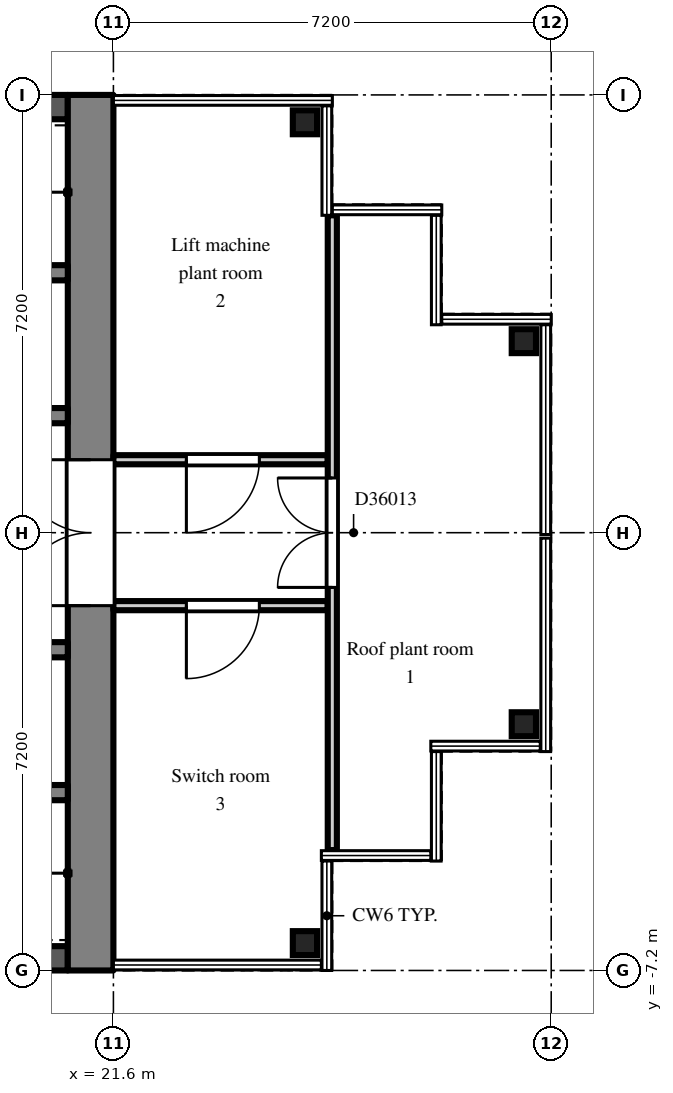
"""IFC4 building model, lengths in metres.
Left out: names, types, materials, properties, quantities, classifications, styles, units other than length and angle.
Written with IfcOpenShell. Run it as: python <this file> out.ifc"""

import sys

from ifc_helpers import new_model, si_unit, direction, frame, frame_2d, origin, origin_2d, place, context, subcontext, project, spatial, polyline, rectangle, i_section, outline, extrude, element, fill, save


model = new_model("IFC4")
c1 = context("Model", 3, precision=1e-05, world=origin(), true_north=direction((0.0, 1.0)))
c2 = subcontext(c1, "Body", "Model", "MODEL_VIEW")
j1 = project(units=[si_unit("LENGTHUNIT", "METRE"), si_unit("PLANEANGLEUNIT", "RADIAN")], contexts=[c1])
p1 = place(None, origin())
s1 = spatial("IfcSite", under=j1, at=p1, CompositionType="ELEMENT")
p2 = place(p1, origin())
s2 = spatial("IfcBuilding", under=s1, at=p2, CompositionType="ELEMENT")
p3 = place(p2, frame((0.0, 0.0, 247.5)))
s3 = spatial("IfcBuildingStorey", under=s2, at=p3, CompositionType="ELEMENT", Elevation=247.5)
for number, where, z_axis, x_axis in (
    (1, (24.75, -6.75, 0.0), (0.0, 0.0, 1.0), (1.0, 0.0, 0.0)),
    (2, (24.75, 6.75, 0.0), (0.0, 0.0, 1.0), (1.0, 0.0, 0.0)),
):
    element("IfcColumn", number, at=place(p3, frame(where, z_axis=z_axis, x_axis=x_axis)), inside=s3, PredefinedType="COLUMN", context=c2, shape_type="SweptSolid", body=[
        extrude(i_section(OverallWidth=0.399, OverallDepth=0.394, WebThickness=0.023, FlangeThickness=0.037, FilletRadius=0.015, at=origin_2d()), origin(), (0.0, 0.0, 1.0), 9.812),
    ])
for number, where, z_axis, x_axis in (
    (3, (28.35, -3.15, 0.0), (0.0, 0.0, 1.0), (1.0, 0.0, 0.0)),
    (4, (28.35, 3.15, 0.0), (0.0, 0.0, 1.0), (1.0, 0.0, 0.0)),
):
    element("IfcColumn", number, at=place(p3, frame(where, z_axis=z_axis, x_axis=x_axis)), inside=s3, PredefinedType="COLUMN", context=c2, shape_type="SweptSolid", body=[
        extrude(i_section(OverallWidth=0.399, OverallDepth=0.394, WebThickness=0.023, FlangeThickness=0.037, FilletRadius=0.015, at=origin_2d()), origin(), (0.0, 0.0, 1.0), 11.861),
    ])
p4 = place(p3, frame((21.225, -7.2, 0.0), z_axis=(0.0, 0.0, 1.0), x_axis=(0.0, 1.0, 0.0)))
e5 = element("IfcWall", 5, at=p4, inside=s3, PredefinedType="SHEAR", context=c2, shape_type="SweptSolid", body=[
    extrude(outline(polyline([(0.0, 0.0), (14.4, 0.0), (14.4, 10.033), (7.2, 13.7), (0.0, 10.033), (0.0, 0.0)])), frame((0.0, 0.375, 0.0), z_axis=(0.0, -1.0, 0.0), x_axis=(1.0, 0.0, 0.0)), (0.0, 0.0, 1.0), 0.75),
])
p5 = place(p4, frame((6.0, 0.0, 0.0)))
e6 = element("IfcOpeningElement", 6, at=p5, cuts=e5, PredefinedType="OPENING", context=c2, shape_type="SweptSolid", body=[
    extrude(rectangle(XDim=2.4, YDim=2.2, at=frame_2d((1.2, 1.1))), frame((0.0, 0.385, 0.0), z_axis=(0.0, -1.0, 0.0), x_axis=(1.0, 0.0, 0.0)), (0.0, 0.0, 1.0), 0.77),
])
p6 = place(p3, frame((7.9, 7.0, 0.0), z_axis=(0.0, 0.0, 1.0), x_axis=(1.0, 0.0, 0.0)))
e7 = element("IfcWall", 7, at=p6, inside=s3, PredefinedType="SHEAR", context=c2, shape_type="SweptSolid", body=[
    extrude(rectangle(XDim=12.95, YDim=0.4, at=frame_2d((6.475, 0.0))), origin(), (0.0, 0.0, 1.0), 10.135),
])
p7 = place(p3, frame((7.9, 1.925, 0.0), z_axis=(0.0, 0.0, 1.0), x_axis=(1.0, 0.0, 0.0)))
e8 = element("IfcWall", 8, at=p7, inside=s3, PredefinedType="SHEAR", context=c2, shape_type="SweptSolid", body=[
    extrude(rectangle(XDim=12.95, YDim=0.25, at=frame_2d((6.475, 0.0))), origin(), (0.0, 0.0, 1.0), 12.72),
])
p8 = place(p7, frame((0.525, 0.0, 0.0)))
e9 = element("IfcOpeningElement", 9, at=p8, cuts=e8, PredefinedType="OPENING", context=c2, shape_type="SweptSolid", body=[
    extrude(rectangle(XDim=0.9, YDim=2.1, at=frame_2d((0.45, 1.05))), frame((0.0, 0.135, 0.0), z_axis=(0.0, -1.0, 0.0), x_axis=(1.0, 0.0, 0.0)), (0.0, 0.0, 1.0), 0.27),
])
p9 = place(p7, frame((2.625, 0.0, 0.0)))
e10 = element("IfcOpeningElement", 10, at=p9, cuts=e8, PredefinedType="OPENING", context=c2, shape_type="SweptSolid", body=[
    extrude(rectangle(XDim=1.1, YDim=2.1, at=frame_2d((0.55, 1.05))), frame((0.0, 0.135, 0.0), z_axis=(0.0, -1.0, 0.0), x_axis=(1.0, 0.0, 0.0)), (0.0, 0.0, 1.0), 0.27),
])
p10 = place(p7, frame((4.925, 0.0, 0.0)))
e11 = element("IfcOpeningElement", 11, at=p10, cuts=e8, PredefinedType="OPENING", context=c2, shape_type="SweptSolid", body=[
    extrude(rectangle(XDim=0.9, YDim=2.1, at=frame_2d((0.45, 1.05))), frame((0.0, 0.135, 0.0), z_axis=(0.0, -1.0, 0.0), x_axis=(1.0, 0.0, 0.0)), (0.0, 0.0, 1.0), 0.27),
])
p11 = place(p7, frame((8.225, 0.0, 0.0)))
e12 = element("IfcOpeningElement", 12, at=p11, cuts=e8, PredefinedType="OPENING", context=c2, shape_type="SweptSolid", body=[
    extrude(rectangle(XDim=0.9, YDim=2.1, at=frame_2d((0.45, 1.05))), frame((0.0, 0.135, 0.0), z_axis=(0.0, -1.0, 0.0), x_axis=(1.0, 0.0, 0.0)), (0.0, 0.0, 1.0), 0.27),
])
p12 = place(p7, frame((11.525, 0.0, 0.0)))
e13 = element("IfcOpeningElement", 13, at=p12, cuts=e8, PredefinedType="OPENING", context=c2, shape_type="SweptSolid", body=[
    extrude(rectangle(XDim=0.9, YDim=2.1, at=frame_2d((0.45, 1.05))), frame((0.0, 0.135, 0.0), z_axis=(0.0, -1.0, 0.0), x_axis=(1.0, 0.0, 0.0)), (0.0, 0.0, 1.0), 0.27),
])
p13 = place(p3, frame((12.3, 4.275, 0.0), z_axis=(0.0, 0.0, 1.0), x_axis=(1.0, 0.0, 0.0)))
e14 = element("IfcWall", 14, at=p13, inside=s3, PredefinedType="SHEAR", context=c2, shape_type="SweptSolid", body=[
    extrude(rectangle(XDim=8.55, YDim=0.25, at=frame_2d((4.275, 0.0))), origin(), (0.0, 0.0, 1.0), 11.523),
])
p14 = place(p3, frame((7.9, -7.0, 0.0), z_axis=(0.0, 0.0, 1.0), x_axis=(1.0, 0.0, 0.0)))
e15 = element("IfcWall", 15, at=p14, inside=s3, PredefinedType="SHEAR", context=c2, shape_type="SweptSolid", body=[
    extrude(rectangle(XDim=12.95, YDim=0.4, at=frame_2d((6.475, 0.0))), origin(), (0.0, 0.0, 1.0), 10.135),
])
p15 = place(p3, frame((7.9, -1.925, 0.0), z_axis=(0.0, 0.0, 1.0), x_axis=(1.0, 0.0, 0.0)))
e16 = element("IfcWall", 16, at=p15, inside=s3, PredefinedType="SHEAR", context=c2, shape_type="SweptSolid", body=[
    extrude(rectangle(XDim=12.95, YDim=0.25, at=frame_2d((6.475, 0.0))), origin(), (0.0, 0.0, 1.0), 12.72),
])
p16 = place(p15, frame((0.525, 0.0, 0.0)))
e17 = element("IfcOpeningElement", 17, at=p16, cuts=e16, PredefinedType="OPENING", context=c2, shape_type="SweptSolid", body=[
    extrude(rectangle(XDim=0.9, YDim=2.1, at=frame_2d((0.45, 1.05))), frame((0.0, 0.135, 0.0), z_axis=(0.0, -1.0, 0.0), x_axis=(1.0, 0.0, 0.0)), (0.0, 0.0, 1.0), 0.27),
])
p17 = place(p15, frame((2.625, 0.0, 0.0)))
e18 = element("IfcOpeningElement", 18, at=p17, cuts=e16, PredefinedType="OPENING", context=c2, shape_type="SweptSolid", body=[
    extrude(rectangle(XDim=1.1, YDim=2.1, at=frame_2d((0.55, 1.05))), frame((0.0, 0.135, 0.0), z_axis=(0.0, -1.0, 0.0), x_axis=(1.0, 0.0, 0.0)), (0.0, 0.0, 1.0), 0.27),
])
p18 = place(p15, frame((4.925, 0.0, 0.0)))
e19 = element("IfcOpeningElement", 19, at=p18, cuts=e16, PredefinedType="OPENING", context=c2, shape_type="SweptSolid", body=[
    extrude(rectangle(XDim=0.9, YDim=2.1, at=frame_2d((0.45, 1.05))), frame((0.0, 0.135, 0.0), z_axis=(0.0, -1.0, 0.0), x_axis=(1.0, 0.0, 0.0)), (0.0, 0.0, 1.0), 0.27),
])
p19 = place(p15, frame((8.225, 0.0, 0.0)))
e20 = element("IfcOpeningElement", 20, at=p19, cuts=e16, PredefinedType="OPENING", context=c2, shape_type="SweptSolid", body=[
    extrude(rectangle(XDim=0.9, YDim=2.1, at=frame_2d((0.45, 1.05))), frame((0.0, 0.135, 0.0), z_axis=(0.0, -1.0, 0.0), x_axis=(1.0, 0.0, 0.0)), (0.0, 0.0, 1.0), 0.27),
])
p20 = place(p15, frame((11.525, 0.0, 0.0)))
e21 = element("IfcOpeningElement", 21, at=p20, cuts=e16, PredefinedType="OPENING", context=c2, shape_type="SweptSolid", body=[
    extrude(rectangle(XDim=0.9, YDim=2.1, at=frame_2d((0.45, 1.05))), frame((0.0, 0.135, 0.0), z_axis=(0.0, -1.0, 0.0), x_axis=(1.0, 0.0, 0.0)), (0.0, 0.0, 1.0), 0.27),
])
p21 = place(p3, frame((12.3, -4.275, 0.0), z_axis=(0.0, 0.0, 1.0), x_axis=(1.0, 0.0, 0.0)))
e22 = element("IfcWall", 22, at=p21, inside=s3, PredefinedType="SHEAR", context=c2, shape_type="SweptSolid", body=[
    extrude(rectangle(XDim=8.55, YDim=0.25, at=frame_2d((4.275, 0.0))), origin(), (0.0, 0.0, 1.0), 11.523),
])
p22 = place(p3, frame((21.6, -1.2, 0.0), z_axis=(0.0, 0.0, 1.0), x_axis=(1.0, 0.0, 0.0)))
e23 = element("IfcWall", 23, at=p22, inside=s3, PredefinedType="PARTITIONING", context=c2, shape_type="SweptSolid", body=[
    extrude(rectangle(XDim=3.525, YDim=0.15, at=frame_2d((1.762, 0.0))), origin(), (0.0, 0.0, 1.0), 2.7),
])
p23 = place(p22, frame((1.2, 0.0, 0.0)))
e24 = element("IfcOpeningElement", 24, at=p23, cuts=e23, PredefinedType="OPENING", context=c2, shape_type="SweptSolid", body=[
    extrude(rectangle(XDim=1.2, YDim=2.1, at=frame_2d((0.6, 1.05))), frame((0.0, 0.085, 0.0), z_axis=(0.0, -1.0, 0.0), x_axis=(1.0, 0.0, 0.0)), (0.0, 0.0, 1.0), 0.17),
])
p24 = place(p3, frame((21.6, 1.2, 0.0), z_axis=(0.0, 0.0, 1.0), x_axis=(1.0, 0.0, 0.0)))
e25 = element("IfcWall", 25, at=p24, inside=s3, PredefinedType="PARTITIONING", context=c2, shape_type="SweptSolid", body=[
    extrude(rectangle(XDim=3.525, YDim=0.15, at=frame_2d((1.762, 0.0))), origin(), (0.0, 0.0, 1.0), 2.7),
])
p25 = place(p24, frame((1.2, 0.0, 0.0)))
e26 = element("IfcOpeningElement", 26, at=p25, cuts=e25, PredefinedType="OPENING", context=c2, shape_type="SweptSolid", body=[
    extrude(rectangle(XDim=1.2, YDim=2.1, at=frame_2d((0.6, 1.05))), frame((0.0, 0.085, 0.0), z_axis=(0.0, -1.0, 0.0), x_axis=(1.0, 0.0, 0.0)), (0.0, 0.0, 1.0), 0.17),
])
p26 = place(p3, frame((25.2, -5.22, 0.0), z_axis=(0.0, 0.0, 1.0), x_axis=(0.0, 1.0, 0.0)))
e27 = element("IfcWall", 27, at=p26, inside=s3, PredefinedType="PARTITIONING", context=c2, shape_type="SweptSolid", body=[
    extrude(rectangle(XDim=10.44, YDim=0.15, at=frame_2d((5.22, 0.0))), origin(), (0.0, 0.0, 1.0), 2.7),
])
p27 = place(p26, frame((4.32, 0.0, 0.0)))
e28 = element("IfcOpeningElement", 28, at=p27, cuts=e27, PredefinedType="OPENING", context=c2, shape_type="SweptSolid", body=[
    extrude(rectangle(XDim=1.8, YDim=2.1, at=frame_2d((0.9, 1.05))), frame((0.0, 0.085, 0.0), z_axis=(0.0, -1.0, 0.0), x_axis=(1.0, 0.0, 0.0)), (0.0, 0.0, 1.0), 0.17),
])
p28 = place(p5, origin())
e29 = element("IfcDoor", 29, at=p28, inside=s3, OperationType="DOUBLE_DOOR_DOUBLE_SWING", PredefinedType="DOOR", context=c2, shape_type="SweptSolid", body=[
    extrude(rectangle(XDim=2.4, YDim=2.2, at=frame_2d((1.2, 1.1))), frame((0.0, 0.025, 0.0), z_axis=(0.0, -1.0, 0.0), x_axis=(1.0, 0.0, 0.0)), (0.0, 0.0, 1.0), 0.05),
])
fill(e6, e29)
p29 = place(p27, origin())
e30 = element("IfcDoor", 30, at=p29, inside=s3, OperationType="DOUBLE_DOOR_DOUBLE_SWING", PredefinedType="DOOR", context=c2, shape_type="SweptSolid", body=[
    extrude(rectangle(XDim=1.8, YDim=2.1, at=frame_2d((0.9, 1.05))), frame((0.0, 0.025, 0.0), z_axis=(0.0, -1.0, 0.0), x_axis=(1.0, 0.0, 0.0)), (0.0, 0.0, 1.0), 0.05),
])
fill(e28, e30)
p30 = place(p25, frame((1.2, 0.0, 0.0), z_axis=(0.0, 0.0, 1.0), x_axis=(-1.0, 0.0, 0.0)))
e31 = element("IfcDoor", 31, at=p30, inside=s3, OperationType="SINGLE_SWING_RIGHT", PredefinedType="DOOR", context=c2, shape_type="SweptSolid", body=[
    extrude(rectangle(XDim=1.2, YDim=2.1, at=frame_2d((0.6, 1.05))), frame((0.0, 0.025, 0.0), z_axis=(0.0, -1.0, 0.0), x_axis=(1.0, 0.0, 0.0)), (0.0, 0.0, 1.0), 0.05),
])
fill(e26, e31)
p31 = place(p23, frame((1.2, 0.0, 0.0), z_axis=(0.0, 0.0, 1.0), x_axis=(-1.0, 0.0, 0.0)))
e32 = element("IfcDoor", 32, at=p31, inside=s3, OperationType="SINGLE_SWING_RIGHT", PredefinedType="DOOR", context=c2, shape_type="SweptSolid", body=[
    extrude(rectangle(XDim=1.2, YDim=2.1, at=frame_2d((0.6, 1.05))), frame((0.0, 0.025, 0.0), z_axis=(0.0, -1.0, 0.0), x_axis=(1.0, 0.0, 0.0)), (0.0, 0.0, 1.0), 0.05),
])
fill(e24, e32)
save(model, sys.argv[1])
